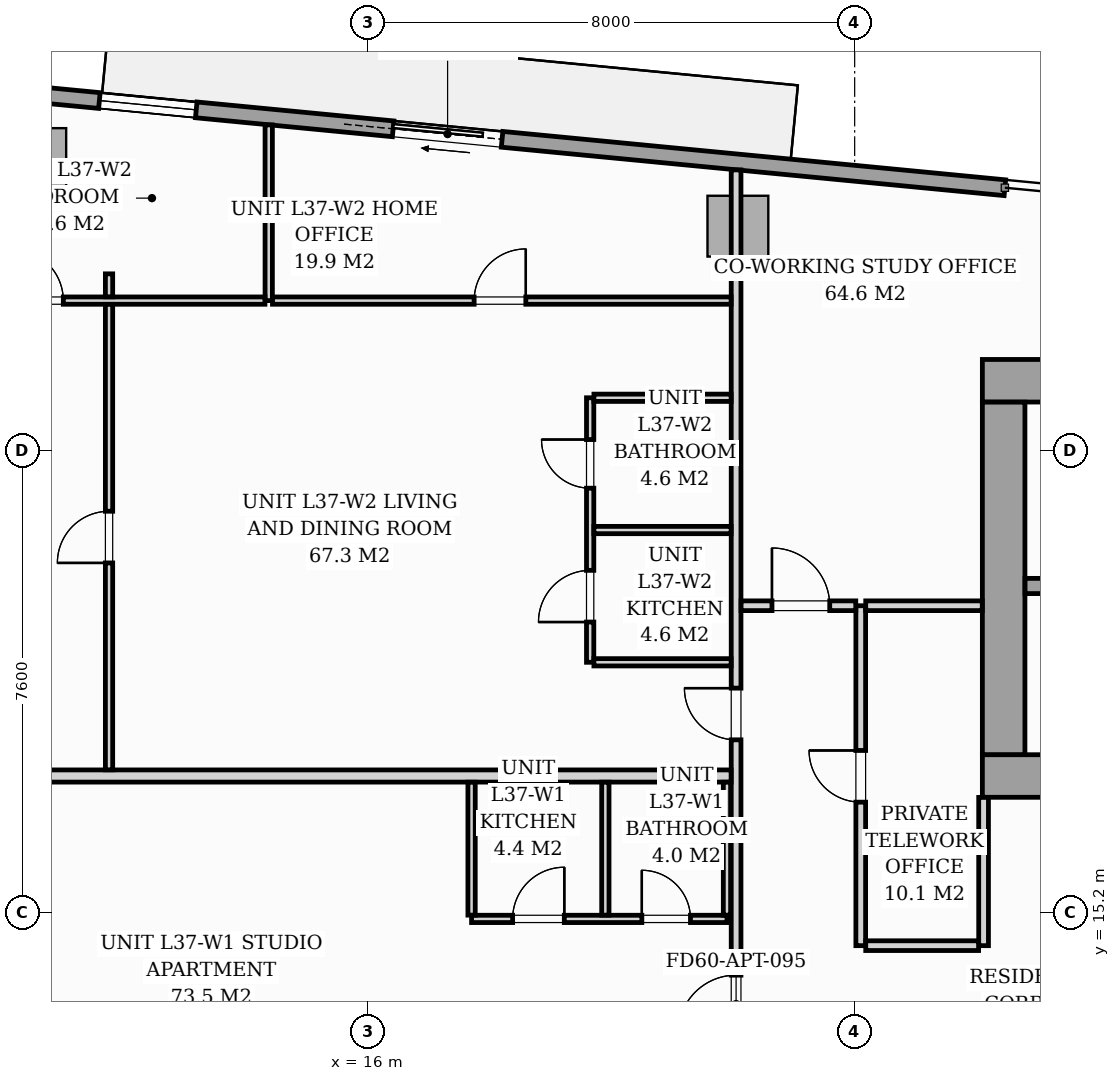
"""IFC4 building model, lengths in metres.
Left out: names, types, materials, properties, quantities, classifications, styles, units other than length and angle.
Written with IfcOpenShell. Run it as: python <this file> out.ifc"""

import sys

from ifc_helpers import new_model, si_unit, direction, frame, frame_2d, origin, origin_2d, place, context, subcontext, project, spatial, rectangle, i_section, extrude, source, transform, mapped, element, fill, save


model = new_model("IFC4")
c1 = context("Model", 3, precision=1e-05, world=origin(), true_north=direction((0.0, 1.0)))
c2 = subcontext(c1, "Body", "Model", "MODEL_VIEW")
j1 = project(units=[si_unit("LENGTHUNIT", "METRE"), si_unit("PLANEANGLEUNIT", "RADIAN")], contexts=[c1])
p1 = place(None, origin())
s1 = spatial("IfcSite", under=j1, at=p1, CompositionType="ELEMENT")
p2 = place(p1, origin())
s2 = spatial("IfcBuilding", under=s1, at=p2, CompositionType="ELEMENT")
p3 = place(p2, frame((0.0, 0.0, 131.0)))
s3 = spatial("IfcBuildingStorey", under=s2, at=p3, CompositionType="ELEMENT", Elevation=131.0)
m1 = source(origin(), c2, "Body", "SweptSolid", [
    extrude(i_section(OverallWidth=0.421, OverallDepth=0.465, WebThickness=0.045, FlangeThickness=0.073, FilletRadius=0.018, at=origin_2d()), origin(), (0.0, 0.0, 1.0), 3.196),
])
for number, where, z_axis, x_axis in (
    (1, (26.4, 17.4, 0.002), (0.0, 0.0, 1.0), (1.0, 0.0, 0.0)),
    (2, (26.4, 24.0, 0.002), (0.0, 0.0, 1.0), (1.0, 0.0, 0.0)),
):
    element("IfcColumn", number, at=place(p3, frame(where, z_axis=z_axis, x_axis=x_axis)), inside=s3, PredefinedType="PILASTER", context=c2, shape_type="MappedRepresentation", body=[
        mapped(m1, transform((0.0, 0.0, 0.0), scale=1.0)),
    ])
m2 = source(origin(), c2, "Body", "SweptSolid", [
    extrude(rectangle(XDim=1.0, YDim=1.0, at=origin_2d()), origin(), (0.0, 0.0, 1.0), 3.196),
])
for number, where, z_axis, x_axis in (
    (3, (10.533, 27.604, 0.002), (0.0, 0.0, 1.0), (0.995, -0.096, 0.0)),
    (4, (22.08, 26.492, 0.002), (0.0, 0.0, 1.0), (0.995, -0.096, 0.0)),
):
    element("IfcColumn", number, at=place(p3, frame(where, z_axis=z_axis, x_axis=x_axis)), inside=s3, PredefinedType="COLUMN", context=c2, shape_type="MappedRepresentation", body=[
        mapped(m2, transform((0.0, 0.0, 0.0), scale=1.0)),
    ])
p4 = place(p3, frame((9.539, 28.754, 0.0), z_axis=(0.0, 0.0, 1.0), x_axis=(0.995397345886, -0.09583383433, 0.0)))
e5 = element("IfcWall", 5, at=p4, inside=s3, PredefinedType="STANDARD", context=c2, shape_type="SweptSolid", body=[
    extrude(rectangle(XDim=17.01, YDim=0.26, at=frame_2d((8.505, 0.0))), origin(), (0.0, 0.0, 1.0), 2.94),
])
p5 = place(p4, frame((6.903, 0.0, 0.0)))
e6 = element("IfcOpeningElement", 6, at=p5, cuts=e5, PredefinedType="OPENING", context=c2, shape_type="SweptSolid", body=[
    extrude(rectangle(XDim=1.8, YDim=2.06, at=frame_2d((0.9, 1.03))), frame((0.0, 0.14, 0.0), z_axis=(0.0, -1.0, 0.0), x_axis=(1.0, 0.0, 0.0)), (0.0, 0.0, 1.0), 0.28),
])
p6 = place(p4, frame((2.05, 0.0, 0.65)))
e7 = element("IfcOpeningElement", 7, at=p6, cuts=e5, PredefinedType="OPENING", context=c2, shape_type="SweptSolid", body=[
    extrude(rectangle(XDim=1.6, YDim=1.5, at=frame_2d((0.8, 0.75))), frame((0.0, 0.14, 0.0), z_axis=(0.0, -1.0, 0.0), x_axis=(1.0, 0.0, 0.0)), (0.0, 0.0, 1.0), 0.28),
])
p7 = place(p3, frame((26.1, 17.45, 0.0), z_axis=(0.0, 0.0, 1.0), x_axis=(1.0, 0.0, 0.0)))
e8 = element("IfcWall", 8, at=p7, inside=s3, PredefinedType="SHEAR", context=c2, shape_type="SweptSolid", body=[
    extrude(rectangle(XDim=19.8, YDim=0.7, at=frame_2d((9.9, 0.0))), origin(), (0.0, 0.0, 1.0), 3.2),
])
p8 = place(p7, frame((1.05, 0.0, 0.0)))
e9 = element("IfcOpeningElement", 9, at=p8, cuts=e8, PredefinedType="OPENING", context=c2, shape_type="SweptSolid", body=[
    extrude(rectangle(XDim=0.95, YDim=2.06, at=frame_2d((0.475, 1.03))), frame((0.0, 0.36, 0.0), z_axis=(0.0, -1.0, 0.0), x_axis=(1.0, 0.0, 0.0)), (0.0, 0.0, 1.0), 0.72),
])
p9 = place(p7, frame((9.48, 0.0, 0.0)))
e10 = element("IfcOpeningElement", 10, at=p9, cuts=e8, PredefinedType="OPENING", context=c2, shape_type="SweptSolid", body=[
    extrude(rectangle(XDim=0.85, YDim=2.0, at=frame_2d((0.425, 1.0))), frame((0.0, 0.36, 0.0), z_axis=(0.0, -1.0, 0.0), x_axis=(1.0, 0.0, 0.0)), (0.0, 0.0, 1.0), 0.72),
])
p10 = place(p7, frame((17.65, 0.0, 0.0)))
e11 = element("IfcOpeningElement", 11, at=p10, cuts=e8, PredefinedType="OPENING", context=c2, shape_type="SweptSolid", body=[
    extrude(rectangle(XDim=0.95, YDim=2.06, at=frame_2d((0.475, 1.03))), frame((0.0, 0.36, 0.0), z_axis=(0.0, -1.0, 0.0), x_axis=(1.0, 0.0, 0.0)), (0.0, 0.0, 1.0), 0.72),
])
p11 = place(p3, frame((26.1, 23.95, 0.0), z_axis=(0.0, 0.0, 1.0), x_axis=(1.0, 0.0, 0.0)))
e12 = element("IfcWall", 12, at=p11, inside=s3, PredefinedType="SHEAR", context=c2, shape_type="SweptSolid", body=[
    extrude(rectangle(XDim=19.8, YDim=0.7, at=frame_2d((9.9, 0.0))), origin(), (0.0, 0.0, 1.0), 3.2),
])
p12 = place(p3, frame((26.45, 17.802, 0.0), z_axis=(0.0, 0.0, 1.0), x_axis=(0.0, 1.0, 0.0)))
e13 = element("IfcWall", 13, at=p12, inside=s3, PredefinedType="SHEAR", context=c2, shape_type="SweptSolid", body=[
    extrude(rectangle(XDim=5.796, YDim=0.7, at=frame_2d((2.898, 0.0))), origin(), (0.0, 0.0, 1.0), 3.2),
])
p13 = place(p3, frame((26.802, 20.575, 0.0), z_axis=(0.0, 0.0, 1.0), x_axis=(1.0, 0.0, 0.0)))
e14 = element("IfcWall", 14, at=p13, inside=s3, PredefinedType="SOLIDWALL", context=c2, shape_type="SweptSolid", body=[
    extrude(rectangle(XDim=8.148, YDim=0.25, at=frame_2d((4.074, 0.0))), origin(), (0.0, 0.0, 1.0), 3.2),
])
p14 = place(p13, frame((0.348, 0.0, 0.0)))
e15 = element("IfcOpeningElement", 15, at=p14, cuts=e14, PredefinedType="OPENING", context=c2, shape_type="SweptSolid", body=[
    extrude(rectangle(XDim=0.95, YDim=2.06, at=frame_2d((0.475, 1.03))), frame((0.0, 0.135, 0.0), z_axis=(0.0, -1.0, 0.0), x_axis=(1.0, 0.0, 0.0)), (0.0, 0.0, 1.0), 0.27),
])
p15 = place(p3, frame((22.05, 12.732, 0.0), z_axis=(0.0, 0.0, 1.0), x_axis=(0.0, 1.0, 0.0)))
e16 = element("IfcWall", 16, at=p15, inside=s3, PredefinedType="PARTITIONING", context=c2, shape_type="SweptSolid", body=[
    extrude(rectangle(XDim=14.685, YDim=0.16, at=frame_2d((7.343, 0.0))), origin(), (0.0, 0.0, 1.0), 2.94),
])
p16 = place(p15, frame((0.493, 0.0, 0.0)))
e17 = element("IfcOpeningElement", 17, at=p16, cuts=e16, PredefinedType="OPENING", context=c2, shape_type="SweptSolid", body=[
    extrude(rectangle(XDim=0.95, YDim=2.06, at=frame_2d((0.475, 1.03))), frame((0.0, 0.09, 0.0), z_axis=(0.0, -1.0, 0.0), x_axis=(1.0, 0.0, 0.0)), (0.0, 0.0, 1.0), 0.18),
])
p17 = place(p15, frame((5.313, 0.0, 0.0)))
e18 = element("IfcOpeningElement", 18, at=p17, cuts=e16, PredefinedType="OPENING", context=c2, shape_type="SweptSolid", body=[
    extrude(rectangle(XDim=0.85, YDim=2.0, at=frame_2d((0.425, 1.0))), frame((0.0, 0.09, 0.0), z_axis=(0.0, -1.0, 0.0), x_axis=(1.0, 0.0, 0.0)), (0.0, 0.0, 1.0), 0.18),
])
p18 = place(p3, frame((6.019, 17.45, 0.0), z_axis=(0.0, 0.0, 1.0), x_axis=(1.0, 0.0, 0.0)))
e19 = element("IfcWall", 19, at=p18, inside=s3, PredefinedType="PARTITIONING", context=c2, shape_type="SweptSolid", body=[
    extrude(rectangle(XDim=15.949, YDim=0.2, at=frame_2d((7.975, 0.0))), origin(), (0.0, 0.0, 1.0), 2.94),
])
p19 = place(p3, frame((17.7, 15.1, 0.0), z_axis=(0.0, 0.0, 1.0), x_axis=(1.0, 0.0, 0.0)))
e20 = element("IfcWall", 20, at=p19, inside=s3, PredefinedType="PARTITIONING", context=c2, shape_type="SweptSolid", body=[
    extrude(rectangle(XDim=4.2, YDim=0.12, at=frame_2d((2.1, 0.0))), origin(), (0.0, 0.0, 1.0), 2.94),
])
p20 = place(p19, frame((0.675, 0.0, 0.0)))
e21 = element("IfcOpeningElement", 21, at=p20, cuts=e20, PredefinedType="OPENING", context=c2, shape_type="SweptSolid", body=[
    extrude(rectangle(XDim=0.85, YDim=2.05, at=frame_2d((0.425, 1.025))), frame((0.0, 0.07, 0.0), z_axis=(0.0, -1.0, 0.0), x_axis=(1.0, 0.0, 0.0)), (0.0, 0.0, 1.0), 0.14),
])
p21 = place(p19, frame((2.8, 0.0, 0.0)))
e22 = element("IfcOpeningElement", 22, at=p21, cuts=e20, PredefinedType="OPENING", context=c2, shape_type="SweptSolid", body=[
    extrude(rectangle(XDim=0.8, YDim=2.02, at=frame_2d((0.4, 1.01))), frame((0.0, 0.07, 0.0), z_axis=(0.0, -1.0, 0.0), x_axis=(1.0, 0.0, 0.0)), (0.0, 0.0, 1.0), 0.14),
])
for number, where, z_axis, x_axis in (
    (23, (17.7, 15.162, 0.0), (0.0, 0.0, 1.0), (0.0, 1.0, 0.0)),
    (24, (19.9, 15.162, 0.0), (0.0, 0.0, 1.0), (0.0, 1.0, 0.0)),
    (25, (21.9, 15.162, 0.0), (0.0, 0.0, 1.0), (0.0, 1.0, 0.0)),
):
    element("IfcWall", number, at=place(p3, frame(where, z_axis=z_axis, x_axis=x_axis)), inside=s3, PredefinedType="PARTITIONING", context=c2, shape_type="SweptSolid", body=[
        extrude(rectangle(XDim=2.186, YDim=0.12, at=frame_2d((1.093, 0.0))), origin(), (0.0, 0.0, 1.0), 2.94),
    ])
p22 = place(p3, frame((19.65, 19.32, 0.0), z_axis=(0.0, 0.0, 1.0), x_axis=(0.0, 1.0, 0.0)))
e26 = element("IfcWall", 26, at=p22, inside=s3, PredefinedType="PARTITIONING", context=c2, shape_type="SweptSolid", body=[
    extrude(rectangle(XDim=4.35, YDim=0.12, at=frame_2d((2.175, 0.0))), origin(), (0.0, 0.0, 1.0), 2.94),
])
p23 = place(p22, frame((0.662, 0.0, 0.0)))
e27 = element("IfcOpeningElement", 27, at=p23, cuts=e26, PredefinedType="OPENING", context=c2, shape_type="SweptSolid", body=[
    extrude(rectangle(XDim=0.85, YDim=2.05, at=frame_2d((0.425, 1.025))), frame((0.0, 0.07, 0.0), z_axis=(0.0, -1.0, 0.0), x_axis=(1.0, 0.0, 0.0)), (0.0, 0.0, 1.0), 0.14),
])
p24 = place(p22, frame((2.863, 0.0, 0.0)))
e28 = element("IfcOpeningElement", 28, at=p24, cuts=e26, PredefinedType="OPENING", context=c2, shape_type="SweptSolid", body=[
    extrude(rectangle(XDim=0.8, YDim=2.02, at=frame_2d((0.4, 1.01))), frame((0.0, 0.07, 0.0), z_axis=(0.0, -1.0, 0.0), x_axis=(1.0, 0.0, 0.0)), (0.0, 0.0, 1.0), 0.14),
])
for number, where, z_axis, x_axis in (
    (29, (19.712, 21.495, 0.0), (0.0, 0.0, 1.0), (1.0, 0.0, 0.0)),
    (30, (19.712, 19.32, 0.0), (0.0, 0.0, 1.0), (1.0, 0.0, 0.0)),
    (31, (19.712, 23.67, 0.0), (0.0, 0.0, 1.0), (1.0, 0.0, 0.0)),
):
    element("IfcWall", number, at=place(p3, frame(where, z_axis=z_axis, x_axis=x_axis)), inside=s3, PredefinedType="PARTITIONING", context=c2, shape_type="SweptSolid", body=[
        extrude(rectangle(XDim=2.256, YDim=0.12, at=frame_2d((1.128, 0.0))), origin(), (0.0, 0.0, 1.0), 2.94),
    ])
p25 = place(p3, frame((14.364, 25.268, 0.0), z_axis=(0.0, 0.0, 1.0), x_axis=(0.0, 1.0, 0.0)))
e32 = element("IfcWall", 32, at=p25, inside=s3, PredefinedType="PARTITIONING", context=c2, shape_type="SweptSolid", body=[
    extrude(rectangle(XDim=2.889, YDim=0.12, at=frame_2d((1.445, 0.0))), origin(), (0.0, 0.0, 1.0), 2.94),
])
p26 = place(p3, frame((6.772, 25.268, 0.0), z_axis=(0.0, 0.0, 1.0), x_axis=(1.0, 0.0, 0.0)))
e33 = element("IfcWall", 33, at=p26, inside=s3, PredefinedType="PARTITIONING", context=c2, shape_type="SweptSolid", body=[
    extrude(rectangle(XDim=7.53, YDim=0.12, at=frame_2d((3.765, 0.0))), origin(), (0.0, 0.0, 1.0), 2.94),
])
p27 = place(p26, frame((3.364, 0.0, 0.0)))
e34 = element("IfcOpeningElement", 34, at=p27, cuts=e33, PredefinedType="OPENING", context=c2, shape_type="SweptSolid", body=[
    extrude(rectangle(XDim=0.85, YDim=2.05, at=frame_2d((0.425, 1.025))), frame((0.0, 0.07, 0.0), z_axis=(0.0, -1.0, 0.0), x_axis=(1.0, 0.0, 0.0)), (0.0, 0.0, 1.0), 0.14),
])
p28 = place(p3, frame((14.426, 25.268, 0.0), z_axis=(0.0, 0.0, 1.0), x_axis=(1.0, 0.0, 0.0)))
e35 = element("IfcWall", 35, at=p28, inside=s3, PredefinedType="PARTITIONING", context=c2, shape_type="SweptSolid", body=[
    extrude(rectangle(XDim=7.542, YDim=0.12, at=frame_2d((3.771, 0.0))), origin(), (0.0, 0.0, 1.0), 2.94),
])
p29 = place(p28, frame((3.316, 0.0, 0.0)))
e36 = element("IfcOpeningElement", 36, at=p29, cuts=e35, PredefinedType="OPENING", context=c2, shape_type="SweptSolid", body=[
    extrude(rectangle(XDim=0.85, YDim=2.05, at=frame_2d((0.425, 1.025))), frame((0.0, 0.07, 0.0), z_axis=(0.0, -1.0, 0.0), x_axis=(1.0, 0.0, 0.0)), (0.0, 0.0, 1.0), 0.14),
])
p30 = place(p3, frame((11.738, 17.552, 0.0), z_axis=(0.0, 0.0, 1.0), x_axis=(0.0, 1.0, 0.0)))
e37 = element("IfcWall", 37, at=p30, inside=s3, PredefinedType="PARTITIONING", context=c2, shape_type="SweptSolid", body=[
    extrude(rectangle(XDim=7.654, YDim=0.12, at=frame_2d((3.827, 0.0))), origin(), (0.0, 0.0, 1.0), 2.94),
])
p31 = place(p30, frame((3.402, 0.0, 0.0)))
e38 = element("IfcOpeningElement", 38, at=p31, cuts=e37, PredefinedType="OPENING", context=c2, shape_type="SweptSolid", body=[
    extrude(rectangle(XDim=0.85, YDim=2.05, at=frame_2d((0.425, 1.025))), frame((0.0, 0.07, 0.0), z_axis=(0.0, -1.0, 0.0), x_axis=(1.0, 0.0, 0.0)), (0.0, 0.0, 1.0), 0.14),
])
p32 = place(p3, frame((11.738, 25.33, 0.0), z_axis=(0.0, 0.0, 1.0), x_axis=(0.0, 1.0, 0.0)))
e39 = element("IfcWall", 39, at=p32, inside=s3, PredefinedType="PARTITIONING", context=c2, shape_type="SweptSolid", body=[
    extrude(rectangle(XDim=0.378, YDim=0.12, at=frame_2d((0.189, 0.0))), origin(), (0.0, 0.0, 1.0), 2.94),
])
p33 = place(p3, frame((24.1, 14.66, 0.0), z_axis=(0.0, 0.0, 1.0), x_axis=(0.0, 1.0, 0.0)))
e40 = element("IfcWall", 40, at=p33, inside=s3, PredefinedType="PARTITIONING", context=c2, shape_type="SweptSolid", body=[
    extrude(rectangle(XDim=5.59, YDim=0.16, at=frame_2d((2.795, 0.0))), origin(), (0.0, 0.0, 1.0), 2.94),
])
p34 = place(p33, frame((2.36, 0.0, 0.0)))
e41 = element("IfcOpeningElement", 41, at=p34, cuts=e40, PredefinedType="OPENING", context=c2, shape_type="SweptSolid", body=[
    extrude(rectangle(XDim=0.85, YDim=2.0, at=frame_2d((0.425, 1.0))), frame((0.0, 0.09, 0.0), z_axis=(0.0, -1.0, 0.0), x_axis=(1.0, 0.0, 0.0)), (0.0, 0.0, 1.0), 0.18),
])
p35 = place(p3, frame((22.132, 20.25, 0.0), z_axis=(0.0, 0.0, 1.0), x_axis=(1.0, 0.0, 0.0)))
e42 = element("IfcWall", 42, at=p35, inside=s3, PredefinedType="PARTITIONING", context=c2, shape_type="SweptSolid", body=[
    extrude(rectangle(XDim=1.886, YDim=0.16, at=frame_2d((0.943, 0.0))), origin(), (0.0, 0.0, 1.0), 2.94),
])
p36 = place(p35, frame((0.508, 0.0, 0.0)))
e43 = element("IfcOpeningElement", 43, at=p36, cuts=e42, PredefinedType="OPENING", context=c2, shape_type="SweptSolid", body=[
    extrude(rectangle(XDim=0.95, YDim=2.06, at=frame_2d((0.475, 1.03))), frame((0.0, 0.09, 0.0), z_axis=(0.0, -1.0, 0.0), x_axis=(1.0, 0.0, 0.0)), (0.0, 0.0, 1.0), 0.18),
])
p37 = place(p3, frame((24.182, 20.25, 0.0), z_axis=(0.0, 0.0, 1.0), x_axis=(1.0, 0.0, 0.0)))
e44 = element("IfcWall", 44, at=p37, inside=s3, PredefinedType="PARTITIONING", context=c2, shape_type="SweptSolid", body=[
    extrude(rectangle(XDim=1.916, YDim=0.16, at=frame_2d((0.958, 0.0))), origin(), (0.0, 0.0, 1.0), 2.94),
])
p38 = place(p3, frame((26.12, 14.66, 0.0), z_axis=(0.0, 0.0, 1.0), x_axis=(0.0, 1.0, 0.0)))
e45 = element("IfcWall", 45, at=p38, inside=s3, PredefinedType="PARTITIONING", context=c2, shape_type="SweptSolid", body=[
    extrude(rectangle(XDim=2.438, YDim=0.16, at=frame_2d((1.219, 0.0))), origin(), (0.0, 0.0, 1.0), 2.94),
])
p39 = place(p3, frame((24.182, 14.66, 0.0), z_axis=(0.0, 0.0, 1.0), x_axis=(1.0, 0.0, 0.0)))
e46 = element("IfcWall", 46, at=p39, inside=s3, PredefinedType="PARTITIONING", context=c2, shape_type="SweptSolid", body=[
    extrude(rectangle(XDim=1.856, YDim=0.16, at=frame_2d((0.928, 0.0))), origin(), (0.0, 0.0, 1.0), 2.94),
])
m3 = source(origin(), c2, "Body", "SweptSolid", [
    extrude(rectangle(XDim=1.8, YDim=2.06, at=frame_2d((0.9, 1.03))), frame((0.0, 0.025, 0.0), z_axis=(0.0, -1.0, 0.0), x_axis=(1.0, 0.0, 0.0)), (0.0, 0.0, 1.0), 0.05),
])
p40 = place(p5, origin())
e47 = element("IfcDoor", 47, at=p40, inside=s3, OperationType="SLIDING_TO_LEFT", PredefinedType="DOOR", context=c2, shape_type="MappedRepresentation", body=[
    mapped(m3, transform((0.0, 0.0, 0.0), scale=1.0)),
])
fill(e6, e47)
m4 = source(origin(), c2, "Body", "SweptSolid", [
    extrude(rectangle(XDim=1.6, YDim=1.5, at=frame_2d((0.8, 0.75))), frame((0.0, 0.03, 0.0), z_axis=(0.0, -1.0, 0.0), x_axis=(1.0, 0.0, 0.0)), (0.0, 0.0, 1.0), 0.06),
])
p41 = place(p6, origin())
e48 = element("IfcWindow", 48, at=p41, inside=s3, PartitioningType="SINGLE_PANEL", PredefinedType="WINDOW", context=c2, shape_type="MappedRepresentation", body=[
    mapped(m4, transform((0.0, 0.0, 0.0), scale=1.0)),
])
fill(e7, e48)
m5 = source(origin(), c2, "Body", "SweptSolid", [
    extrude(rectangle(XDim=0.95, YDim=2.06, at=frame_2d((0.475, 1.03))), frame((0.0, 0.025, 0.0), z_axis=(0.0, -1.0, 0.0), x_axis=(1.0, 0.0, 0.0)), (0.0, 0.0, 1.0), 0.05),
])
p42 = place(p16, origin())
e49 = element("IfcDoor", 49, at=p42, inside=s3, OperationType="SINGLE_SWING_LEFT", PredefinedType="DOOR", context=c2, shape_type="MappedRepresentation", body=[
    mapped(m5, transform((0.0, 0.0, 0.0), scale=1.0)),
])
fill(e17, e49)
m6 = source(origin(), c2, "Body", "SweptSolid", [
    extrude(rectangle(XDim=0.85, YDim=2.05, at=frame_2d((0.425, 1.025))), frame((0.0, 0.025, 0.0), z_axis=(0.0, -1.0, 0.0), x_axis=(1.0, 0.0, 0.0)), (0.0, 0.0, 1.0), 0.05),
])
p43 = place(p20, origin())
e50 = element("IfcDoor", 50, at=p43, inside=s3, OperationType="SINGLE_SWING_RIGHT", PredefinedType="DOOR", context=c2, shape_type="MappedRepresentation", body=[
    mapped(m6, transform((0.0, 0.0, 0.0), scale=1.0)),
])
fill(e21, e50)
m7 = source(origin(), c2, "Body", "SweptSolid", [
    extrude(rectangle(XDim=0.8, YDim=2.02, at=frame_2d((0.4, 1.01))), frame((0.0, 0.025, 0.0), z_axis=(0.0, -1.0, 0.0), x_axis=(1.0, 0.0, 0.0)), (0.0, 0.0, 1.0), 0.05),
])
p44 = place(p21, origin())
e51 = element("IfcDoor", 51, at=p44, inside=s3, OperationType="SINGLE_SWING_LEFT", PredefinedType="DOOR", context=c2, shape_type="MappedRepresentation", body=[
    mapped(m7, transform((0.0, 0.0, 0.0), scale=1.0)),
])
fill(e22, e51)
m8 = source(origin(), c2, "Body", "SweptSolid", [
    extrude(rectangle(XDim=0.85, YDim=2.0, at=frame_2d((0.425, 1.0))), frame((0.0, 0.025, 0.0), z_axis=(0.0, -1.0, 0.0), x_axis=(1.0, 0.0, 0.0)), (0.0, 0.0, 1.0), 0.05),
])
p45 = place(p17, origin())
e52 = element("IfcDoor", 52, at=p45, inside=s3, OperationType="SINGLE_SWING_RIGHT", PredefinedType="DOOR", context=c2, shape_type="MappedRepresentation", body=[
    mapped(m8, transform((0.0, 0.0, 0.0), scale=1.0)),
])
fill(e18, e52)
p46 = place(p23, origin())
e53 = element("IfcDoor", 53, at=p46, inside=s3, OperationType="SINGLE_SWING_LEFT", PredefinedType="DOOR", context=c2, shape_type="MappedRepresentation", body=[
    mapped(m6, transform((0.0, 0.0, 0.0), scale=1.0)),
])
fill(e27, e53)
p47 = place(p24, origin())
e54 = element("IfcDoor", 54, at=p47, inside=s3, OperationType="SINGLE_SWING_RIGHT", PredefinedType="DOOR", context=c2, shape_type="MappedRepresentation", body=[
    mapped(m7, transform((0.0, 0.0, 0.0), scale=1.0)),
])
fill(e28, e54)
p48 = place(p27, origin())
e55 = element("IfcDoor", 55, at=p48, inside=s3, OperationType="SINGLE_SWING_LEFT", PredefinedType="DOOR", context=c2, shape_type="MappedRepresentation", body=[
    mapped(m6, transform((0.0, 0.0, 0.0), scale=1.0)),
])
fill(e34, e55)
p49 = place(p29, origin())
e56 = element("IfcDoor", 56, at=p49, inside=s3, OperationType="SINGLE_SWING_RIGHT", PredefinedType="DOOR", context=c2, shape_type="MappedRepresentation", body=[
    mapped(m6, transform((0.0, 0.0, 0.0), scale=1.0)),
])
fill(e36, e56)
p50 = place(p31, origin())
e57 = element("IfcDoor", 57, at=p50, inside=s3, OperationType="SINGLE_SWING_LEFT", PredefinedType="DOOR", context=c2, shape_type="MappedRepresentation", body=[
    mapped(m6, transform((0.0, 0.0, 0.0), scale=1.0)),
])
fill(e38, e57)
p51 = place(p34, origin())
e58 = element("IfcDoor", 58, at=p51, inside=s3, OperationType="SINGLE_SWING_RIGHT", PredefinedType="DOOR", context=c2, shape_type="MappedRepresentation", body=[
    mapped(m8, transform((0.0, 0.0, 0.0), scale=1.0)),
])
fill(e41, e58)
p52 = place(p36, origin())
e59 = element("IfcDoor", 59, at=p52, inside=s3, OperationType="SINGLE_SWING_LEFT", PredefinedType="DOOR", context=c2, shape_type="MappedRepresentation", body=[
    mapped(m5, transform((0.0, 0.0, 0.0), scale=1.0)),
])
fill(e43, e59)
save(model, sys.argv[1])
